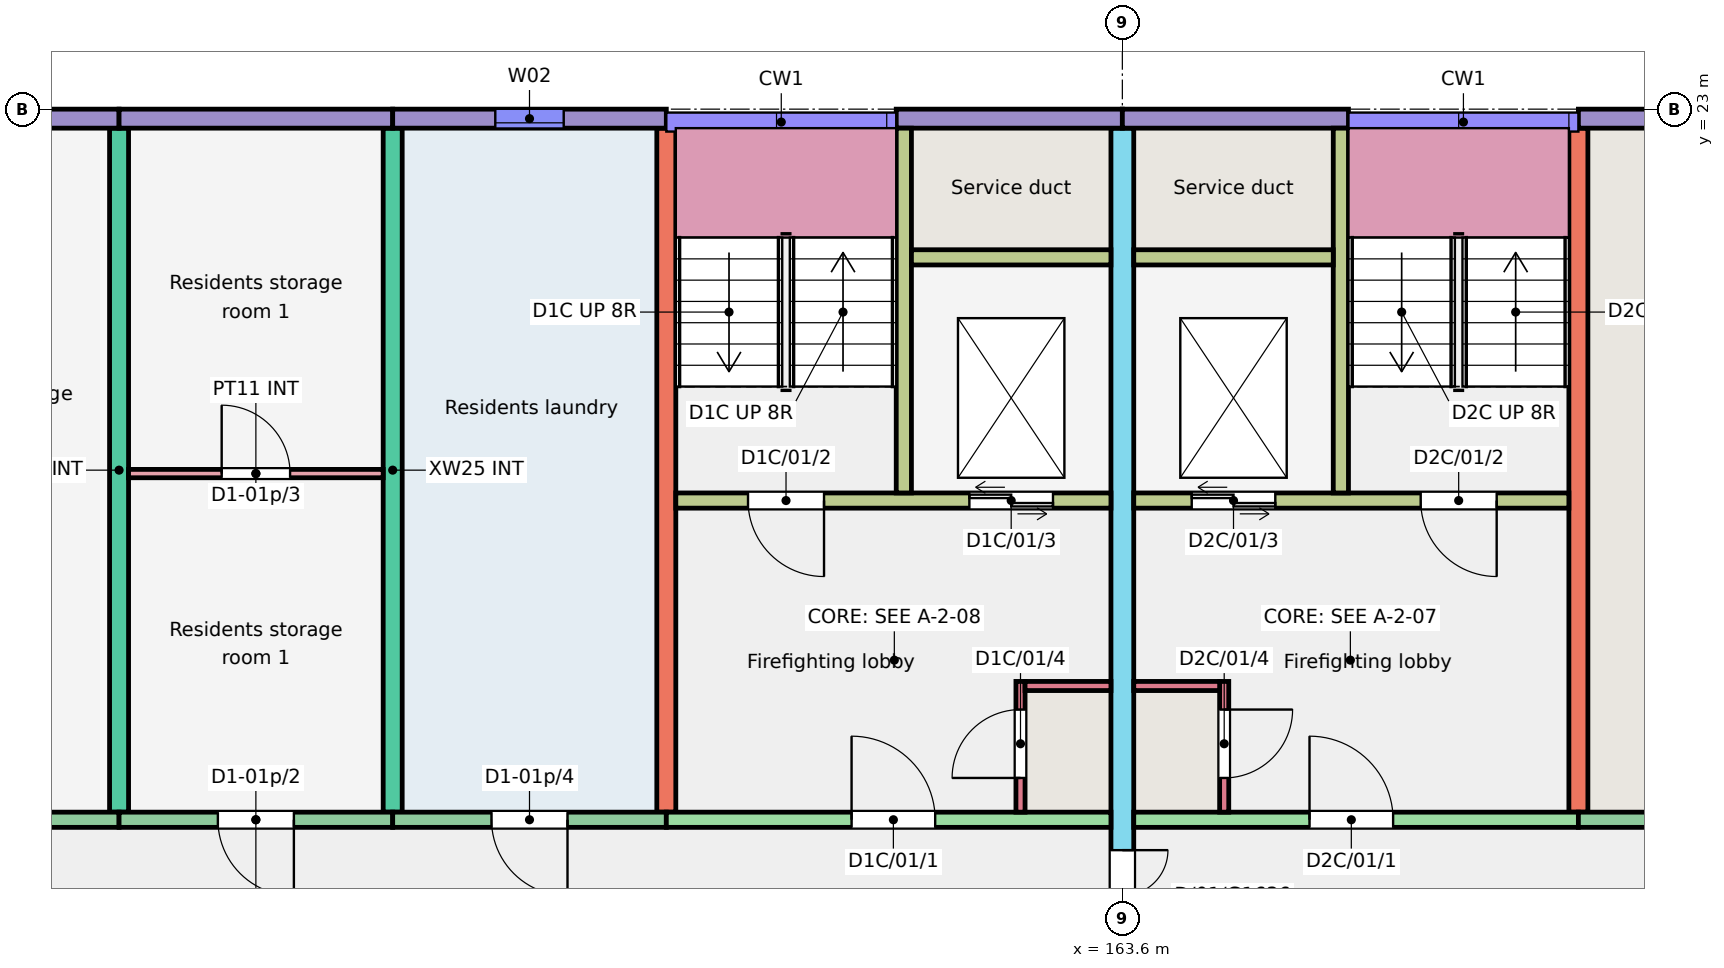
"""IFC4 building model, lengths in metres.
Left out: names, types, materials, properties, quantities, classifications, styles, units other than length and angle.
Written with IfcOpenShell. Run it as: python <this file> out.ifc"""

import sys

from ifc_helpers import new_model, si_unit, direction, frame, frame_2d, origin, place, context, subcontext, project, spatial, rectangle, extrude, element, fill, save


model = new_model("IFC4")
c1 = context("Model", 3, precision=1e-05, world=origin(), true_north=direction((0.0, 1.0)))
c2 = subcontext(c1, "Body", "Model", "MODEL_VIEW")
j1 = project(units=[si_unit("LENGTHUNIT", "METRE"), si_unit("PLANEANGLEUNIT", "RADIAN")], contexts=[c1])
p1 = place(None, origin())
s1 = spatial("IfcSite", under=j1, at=p1, CompositionType="ELEMENT")
p2 = place(p1, origin())
s2 = spatial("IfcBuilding", under=s1, at=p2, CompositionType="ELEMENT")
p3 = place(p2, frame((0.0, 0.0, 3.0)))
s3 = spatial("IfcBuildingStorey", under=s2, at=p3, CompositionType="ELEMENT", Elevation=3.0)
for number, where, z_axis, x_axis in (
    (1, (150.4, 13.75, 0.0), (0.0, 0.0, 1.0), (0.0, 1.0, 0.0)),
    (2, (154.0, 13.75, 0.0), (0.0, 0.0, 1.0), (0.0, 1.0, 0.0)),
    (3, (157.6, 13.75, 0.0), (0.0, 0.0, 1.0), (0.0, 1.0, 0.0)),
):
    element("IfcWall", number, at=place(p3, frame(where, z_axis=z_axis, x_axis=x_axis)), inside=s3, PredefinedType="SHEAR", context=c2, shape_type="SweptSolid", body=[
        extrude(rectangle(XDim=9.0, YDim=0.25, at=frame_2d((4.5, 0.0))), origin(), (0.0, 0.0, 1.0), 3.0),
    ])
p4 = place(p3, frame((163.6, 11.75, 0.0), z_axis=(0.0, 0.0, 1.0), x_axis=(0.0, 1.0, 0.0)))
e4 = element("IfcWall", 4, at=p4, inside=s3, PredefinedType="SHEAR", context=c2, shape_type="SweptSolid", body=[
    extrude(rectangle(XDim=11.0, YDim=0.3, at=frame_2d((5.5, 0.0))), origin(), (0.0, 0.0, 1.0), 3.0),
])
p5 = place(p4, frame((0.3, 0.0, 0.0)))
e5 = element("IfcOpeningElement", 5, at=p5, cuts=e4, PredefinedType="OPENING", context=c2, shape_type="SweptSolid", body=[
    extrude(rectangle(XDim=1.2, YDim=2.1, at=frame_2d((0.6, 1.05))), frame((0.0, 0.16, 0.0), z_axis=(0.0, -1.0, 0.0), x_axis=(1.0, 0.0, 0.0)), (0.0, 0.0, 1.0), 0.32),
])
p6 = place(p3, frame((169.6, 13.75, 0.0), z_axis=(0.0, 0.0, 1.0), x_axis=(0.0, 1.0, 0.0)))
e6 = element("IfcWall", 6, at=p6, inside=s3, PredefinedType="SHEAR", context=c2, shape_type="SweptSolid", body=[
    extrude(rectangle(XDim=9.0, YDim=0.25, at=frame_2d((4.5, 0.0))), origin(), (0.0, 0.0, 1.0), 3.0),
])
p7 = place(p3, frame((146.65, 22.875, 0.0), z_axis=(0.0, 0.0, 1.0), x_axis=(1.0, 0.0, 0.0)))
e7 = element("IfcWall", 7, at=p7, inside=s3, PredefinedType="SOLIDWALL", context=c2, shape_type="SweptSolid", body=[
    extrude(rectangle(XDim=3.75, YDim=0.25, at=frame_2d((1.875, 0.0))), origin(), (0.0, 0.0, 1.0), 3.0),
])
p8 = place(p3, frame((146.95, 13.65, 0.0), z_axis=(0.0, 0.0, 1.0), x_axis=(1.0, 0.0, 0.0)))
e8 = element("IfcWall", 8, at=p8, inside=s3, PredefinedType="SOLIDWALL", context=c2, shape_type="SweptSolid", body=[
    extrude(rectangle(XDim=3.45, YDim=0.2, at=frame_2d((1.725, 0.0))), origin(), (0.0, 0.0, 1.0), 3.0),
])
p9 = place(p8, frame((1.163, 0.0, 0.0)))
e9 = element("IfcOpeningElement", 9, at=p9, cuts=e8, PredefinedType="OPENING", context=c2, shape_type="SweptSolid", body=[
    extrude(rectangle(XDim=1.0, YDim=2.1, at=frame_2d((0.5, 1.05))), frame((0.0, 0.11, 0.0), z_axis=(0.0, -1.0, 0.0), x_axis=(1.0, 0.0, 0.0)), (0.0, 0.0, 1.0), 0.22),
])
p10 = place(p3, frame((150.4, 22.875, 0.0), z_axis=(0.0, 0.0, 1.0), x_axis=(1.0, 0.0, 0.0)))
e10 = element("IfcWall", 10, at=p10, inside=s3, PredefinedType="SOLIDWALL", context=c2, shape_type="SweptSolid", body=[
    extrude(rectangle(XDim=3.6, YDim=0.25, at=frame_2d((1.8, 0.0))), origin(), (0.0, 0.0, 1.0), 3.0),
])
p11 = place(p3, frame((150.4, 13.65, 0.0), z_axis=(0.0, 0.0, 1.0), x_axis=(1.0, 0.0, 0.0)))
e11 = element("IfcWall", 11, at=p11, inside=s3, PredefinedType="SOLIDWALL", context=c2, shape_type="SweptSolid", body=[
    extrude(rectangle(XDim=3.6, YDim=0.2, at=frame_2d((1.8, 0.0))), origin(), (0.0, 0.0, 1.0), 3.0),
])
p12 = place(p11, frame((1.3, 0.0, 0.0)))
e12 = element("IfcOpeningElement", 12, at=p12, cuts=e11, PredefinedType="OPENING", context=c2, shape_type="SweptSolid", body=[
    extrude(rectangle(XDim=1.0, YDim=2.1, at=frame_2d((0.5, 1.05))), frame((0.0, 0.11, 0.0), z_axis=(0.0, -1.0, 0.0), x_axis=(1.0, 0.0, 0.0)), (0.0, 0.0, 1.0), 0.22),
])
p13 = place(p3, frame((154.0, 22.875, 0.0), z_axis=(0.0, 0.0, 1.0), x_axis=(1.0, 0.0, 0.0)))
e13 = element("IfcWall", 13, at=p13, inside=s3, PredefinedType="SOLIDWALL", context=c2, shape_type="SweptSolid", body=[
    extrude(rectangle(XDim=3.6, YDim=0.25, at=frame_2d((1.8, 0.0))), origin(), (0.0, 0.0, 1.0), 3.0),
])
p14 = place(p13, frame((1.35, 0.0, 1.8)))
e14 = element("IfcOpeningElement", 14, at=p14, cuts=e13, PredefinedType="OPENING", context=c2, shape_type="SweptSolid", body=[
    extrude(rectangle(XDim=0.9, YDim=0.6, at=frame_2d((0.45, 0.3))), frame((0.0, 0.135, 0.0), z_axis=(0.0, -1.0, 0.0), x_axis=(1.0, 0.0, 0.0)), (0.0, 0.0, 1.0), 0.27),
])
p15 = place(p3, frame((154.0, 13.65, 0.0), z_axis=(0.0, 0.0, 1.0), x_axis=(1.0, 0.0, 0.0)))
e15 = element("IfcWall", 15, at=p15, inside=s3, PredefinedType="SOLIDWALL", context=c2, shape_type="SweptSolid", body=[
    extrude(rectangle(XDim=3.6, YDim=0.2, at=frame_2d((1.8, 0.0))), origin(), (0.0, 0.0, 1.0), 3.0),
])
p16 = place(p15, frame((1.3, 0.0, 0.0)))
e16 = element("IfcOpeningElement", 16, at=p16, cuts=e15, PredefinedType="OPENING", context=c2, shape_type="SweptSolid", body=[
    extrude(rectangle(XDim=1.0, YDim=2.1, at=frame_2d((0.5, 1.05))), frame((0.0, 0.11, 0.0), z_axis=(0.0, -1.0, 0.0), x_axis=(1.0, 0.0, 0.0)), (0.0, 0.0, 1.0), 0.22),
])
p17 = place(p3, frame((160.625, 22.875, 0.0), z_axis=(0.0, 0.0, 1.0), x_axis=(1.0, 0.0, 0.0)))
e17 = element("IfcWall", 17, at=p17, inside=s3, PredefinedType="SOLIDWALL", context=c2, shape_type="SweptSolid", body=[
    extrude(rectangle(XDim=2.975, YDim=0.25, at=frame_2d((1.488, 0.0))), origin(), (0.0, 0.0, 1.0), 3.0),
])
p18 = place(p3, frame((157.6, 13.65, 0.0), z_axis=(0.0, 0.0, 1.0), x_axis=(1.0, 0.0, 0.0)))
e18 = element("IfcWall", 18, at=p18, inside=s3, PredefinedType="SHEAR", context=c2, shape_type="SweptSolid", body=[
    extrude(rectangle(XDim=5.85, YDim=0.2, at=frame_2d((2.925, 0.0))), origin(), (0.0, 0.0, 1.0), 3.0),
])
p19 = place(p18, frame((2.438, 0.0, 0.0)))
e19 = element("IfcOpeningElement", 19, at=p19, cuts=e18, PredefinedType="OPENING", context=c2, shape_type="SweptSolid", body=[
    extrude(rectangle(XDim=1.1, YDim=2.1, at=frame_2d((0.55, 1.05))), frame((0.0, 0.11, 0.0), z_axis=(0.0, -1.0, 0.0), x_axis=(1.0, 0.0, 0.0)), (0.0, 0.0, 1.0), 0.22),
])
p20 = place(p3, frame((157.725, 17.85, 0.0), z_axis=(0.0, 0.0, 1.0), x_axis=(1.0, 0.0, 0.0)))
e20 = element("IfcWall", 20, at=p20, inside=s3, PredefinedType="SHEAR", context=c2, shape_type="SweptSolid", body=[
    extrude(rectangle(XDim=5.725, YDim=0.2, at=frame_2d((2.862, 0.0))), origin(), (0.0, 0.0, 1.0), 3.0),
])
p21 = place(p20, frame((0.95, 0.0, 0.0)))
e21 = element("IfcOpeningElement", 21, at=p21, cuts=e20, PredefinedType="OPENING", context=c2, shape_type="SweptSolid", body=[
    extrude(rectangle(XDim=1.0, YDim=2.1, at=frame_2d((0.5, 1.05))), frame((0.0, 0.11, 0.0), z_axis=(0.0, -1.0, 0.0), x_axis=(1.0, 0.0, 0.0)), (0.0, 0.0, 1.0), 0.22),
])
p22 = place(p20, frame((3.863, 0.0, 0.0)))
e22 = element("IfcOpeningElement", 22, at=p22, cuts=e20, PredefinedType="OPENING", context=c2, shape_type="SweptSolid", body=[
    extrude(rectangle(XDim=1.1, YDim=2.1, at=frame_2d((0.55, 1.05))), frame((0.0, 0.11, 0.0), z_axis=(0.0, -1.0, 0.0), x_axis=(1.0, 0.0, 0.0)), (0.0, 0.0, 1.0), 0.22),
])
p23 = place(p3, frame((160.725, 17.95, 0.0), z_axis=(0.0, 0.0, 1.0), x_axis=(0.0, 1.0, 0.0)))
e23 = element("IfcWall", 23, at=p23, inside=s3, PredefinedType="SHEAR", context=c2, shape_type="SweptSolid", body=[
    extrude(rectangle(XDim=4.8, YDim=0.2, at=frame_2d((2.4, 0.0))), origin(), (0.0, 0.0, 1.0), 3.0),
])
p24 = place(p3, frame((160.825, 21.05, 0.0), z_axis=(0.0, 0.0, 1.0), x_axis=(1.0, 0.0, 0.0)))
e24 = element("IfcWall", 24, at=p24, inside=s3, PredefinedType="SHEAR", context=c2, shape_type="SweptSolid", body=[
    extrude(rectangle(XDim=2.625, YDim=0.2, at=frame_2d((1.312, 0.0))), origin(), (0.0, 0.0, 1.0), 3.0),
])
p25 = place(p3, frame((162.26, 13.75, 0.0), z_axis=(0.0, 0.0, 1.0), x_axis=(0.0, 1.0, 0.0)))
e25 = element("IfcWall", 25, at=p25, inside=s3, PredefinedType="SHEAR", context=c2, shape_type="SweptSolid", body=[
    extrude(rectangle(XDim=1.72, YDim=0.12, at=frame_2d((0.86, 0.0))), origin(), (0.0, 0.0, 1.0), 3.0),
])
p26 = place(p25, frame((0.45, 0.0, 0.0)))
e26 = element("IfcOpeningElement", 26, at=p26, cuts=e25, PredefinedType="OPENING", context=c2, shape_type="SweptSolid", body=[
    extrude(rectangle(XDim=0.9, YDim=2.1, at=frame_2d((0.45, 1.05))), frame((0.0, 0.07, 0.0), z_axis=(0.0, -1.0, 0.0), x_axis=(1.0, 0.0, 0.0)), (0.0, 0.0, 1.0), 0.14),
])
p27 = place(p3, frame((162.32, 15.41, 0.0), z_axis=(0.0, 0.0, 1.0), x_axis=(1.0, 0.0, 0.0)))
e27 = element("IfcWall", 27, at=p27, inside=s3, PredefinedType="SHEAR", context=c2, shape_type="SweptSolid", body=[
    extrude(rectangle(XDim=1.13, YDim=0.12, at=frame_2d((0.565, 0.0))), origin(), (0.0, 0.0, 1.0), 3.0),
])
p28 = place(p3, frame((163.6, 22.875, 0.0), z_axis=(0.0, 0.0, 1.0), x_axis=(1.0, 0.0, 0.0)))
e28 = element("IfcWall", 28, at=p28, inside=s3, PredefinedType="SOLIDWALL", context=c2, shape_type="SweptSolid", body=[
    extrude(rectangle(XDim=2.975, YDim=0.25, at=frame_2d((1.487, 0.0))), origin(), (0.0, 0.0, 1.0), 3.0),
])
p29 = place(p3, frame((163.75, 13.65, 0.0), z_axis=(0.0, 0.0, 1.0), x_axis=(1.0, 0.0, 0.0)))
e29 = element("IfcWall", 29, at=p29, inside=s3, PredefinedType="SHEAR", context=c2, shape_type="SweptSolid", body=[
    extrude(rectangle(XDim=5.85, YDim=0.2, at=frame_2d((2.925, 0.0))), origin(), (0.0, 0.0, 1.0), 3.0),
])
p30 = place(p29, frame((2.312, 0.0, 0.0)))
e30 = element("IfcOpeningElement", 30, at=p30, cuts=e29, PredefinedType="OPENING", context=c2, shape_type="SweptSolid", body=[
    extrude(rectangle(XDim=1.1, YDim=2.1, at=frame_2d((0.55, 1.05))), frame((0.0, 0.11, 0.0), z_axis=(0.0, -1.0, 0.0), x_axis=(1.0, 0.0, 0.0)), (0.0, 0.0, 1.0), 0.22),
])
p31 = place(p3, frame((163.75, 17.85, 0.0), z_axis=(0.0, 0.0, 1.0), x_axis=(1.0, 0.0, 0.0)))
e31 = element("IfcWall", 31, at=p31, inside=s3, PredefinedType="SHEAR", context=c2, shape_type="SweptSolid", body=[
    extrude(rectangle(XDim=5.725, YDim=0.2, at=frame_2d((2.863, 0.0))), origin(), (0.0, 0.0, 1.0), 3.0),
])
p32 = place(p31, frame((3.775, 0.0, 0.0)))
e32 = element("IfcOpeningElement", 32, at=p32, cuts=e31, PredefinedType="OPENING", context=c2, shape_type="SweptSolid", body=[
    extrude(rectangle(XDim=1.0, YDim=2.1, at=frame_2d((0.5, 1.05))), frame((0.0, 0.11, 0.0), z_axis=(0.0, -1.0, 0.0), x_axis=(1.0, 0.0, 0.0)), (0.0, 0.0, 1.0), 0.22),
])
p33 = place(p31, frame((0.762, 0.0, 0.0)))
e33 = element("IfcOpeningElement", 33, at=p33, cuts=e31, PredefinedType="OPENING", context=c2, shape_type="SweptSolid", body=[
    extrude(rectangle(XDim=1.1, YDim=2.1, at=frame_2d((0.55, 1.05))), frame((0.0, 0.11, 0.0), z_axis=(0.0, -1.0, 0.0), x_axis=(1.0, 0.0, 0.0)), (0.0, 0.0, 1.0), 0.22),
])
p34 = place(p3, frame((166.475, 17.95, 0.0), z_axis=(0.0, 0.0, 1.0), x_axis=(0.0, 1.0, 0.0)))
e34 = element("IfcWall", 34, at=p34, inside=s3, PredefinedType="SHEAR", context=c2, shape_type="SweptSolid", body=[
    extrude(rectangle(XDim=4.8, YDim=0.2, at=frame_2d((2.4, 0.0))), origin(), (0.0, 0.0, 1.0), 3.0),
])
p35 = place(p3, frame((163.75, 21.05, 0.0), z_axis=(0.0, 0.0, 1.0), x_axis=(1.0, 0.0, 0.0)))
e35 = element("IfcWall", 35, at=p35, inside=s3, PredefinedType="SHEAR", context=c2, shape_type="SweptSolid", body=[
    extrude(rectangle(XDim=2.625, YDim=0.2, at=frame_2d((1.312, 0.0))), origin(), (0.0, 0.0, 1.0), 3.0),
])
p36 = place(p3, frame((164.94, 13.75, 0.0), z_axis=(0.0, 0.0, 1.0), x_axis=(0.0, 1.0, 0.0)))
e36 = element("IfcWall", 36, at=p36, inside=s3, PredefinedType="SHEAR", context=c2, shape_type="SweptSolid", body=[
    extrude(rectangle(XDim=1.72, YDim=0.12, at=frame_2d((0.86, 0.0))), origin(), (0.0, 0.0, 1.0), 3.0),
])
p37 = place(p36, frame((0.45, 0.0, 0.0)))
e37 = element("IfcOpeningElement", 37, at=p37, cuts=e36, PredefinedType="OPENING", context=c2, shape_type="SweptSolid", body=[
    extrude(rectangle(XDim=0.9, YDim=2.1, at=frame_2d((0.45, 1.05))), frame((0.0, 0.07, 0.0), z_axis=(0.0, -1.0, 0.0), x_axis=(1.0, 0.0, 0.0)), (0.0, 0.0, 1.0), 0.14),
])
p38 = place(p3, frame((163.75, 15.41, 0.0), z_axis=(0.0, 0.0, 1.0), x_axis=(1.0, 0.0, 0.0)))
e38 = element("IfcWall", 38, at=p38, inside=s3, PredefinedType="SHEAR", context=c2, shape_type="SweptSolid", body=[
    extrude(rectangle(XDim=1.13, YDim=0.12, at=frame_2d((0.565, 0.0))), origin(), (0.0, 0.0, 1.0), 3.0),
])
p39 = place(p3, frame((169.6, 22.875, 0.0), z_axis=(0.0, 0.0, 1.0), x_axis=(1.0, 0.0, 0.0)))
e39 = element("IfcWall", 39, at=p39, inside=s3, PredefinedType="SOLIDWALL", context=c2, shape_type="SweptSolid", body=[
    extrude(rectangle(XDim=3.6, YDim=0.25, at=frame_2d((1.8, 0.0))), origin(), (0.0, 0.0, 1.0), 3.0),
])
p40 = place(p3, frame((169.6, 13.65, 0.0), z_axis=(0.0, 0.0, 1.0), x_axis=(1.0, 0.0, 0.0)))
e40 = element("IfcWall", 40, at=p40, inside=s3, PredefinedType="SOLIDWALL", context=c2, shape_type="SweptSolid", body=[
    extrude(rectangle(XDim=3.6, YDim=0.2, at=frame_2d((1.8, 0.0))), origin(), (0.0, 0.0, 1.0), 3.0),
])
p41 = place(p40, frame((1.3, 0.0, 0.0)))
e41 = element("IfcOpeningElement", 41, at=p41, cuts=e40, PredefinedType="OPENING", context=c2, shape_type="SweptSolid", body=[
    extrude(rectangle(XDim=1.0, YDim=2.1, at=frame_2d((0.5, 1.05))), frame((0.0, 0.11, 0.0), z_axis=(0.0, -1.0, 0.0), x_axis=(1.0, 0.0, 0.0)), (0.0, 0.0, 1.0), 0.22),
])
p42 = place(p3, frame((150.525, 18.205, 0.0), z_axis=(0.0, 0.0, 1.0), x_axis=(1.0, 0.0, 0.0)))
e42 = element("IfcWall", 42, at=p42, inside=s3, PredefinedType="PARTITIONING", context=c2, shape_type="SweptSolid", body=[
    extrude(rectangle(XDim=3.35, YDim=0.11, at=frame_2d((1.675, 0.0))), origin(), (0.0, 0.0, 1.0), 2.8),
])
p43 = place(p42, frame((1.225, 0.0, 0.0)))
e43 = element("IfcOpeningElement", 43, at=p43, cuts=e42, PredefinedType="OPENING", context=c2, shape_type="SweptSolid", body=[
    extrude(rectangle(XDim=0.9, YDim=2.1, at=frame_2d((0.45, 1.05))), frame((0.0, 0.065, 0.0), z_axis=(0.0, -1.0, 0.0), x_axis=(1.0, 0.0, 0.0)), (0.0, 0.0, 1.0), 0.13),
])
p44 = place(p14, origin())
e44 = element("IfcWindow", 44, at=p44, inside=s3, PartitioningType="SINGLE_PANEL", PredefinedType="WINDOW", context=c2, shape_type="SweptSolid", body=[
    extrude(rectangle(XDim=0.9, YDim=0.6, at=frame_2d((0.45, 0.3))), frame((0.0, -0.025, 0.0), z_axis=(0.0, -1.0, 0.0), x_axis=(1.0, 0.0, 0.0)), (0.0, 0.0, 1.0), 0.06),
])
fill(e14, e44)
p45 = place(p12, origin())
e45 = element("IfcDoor", 45, at=p45, inside=s3, OperationType="SINGLE_SWING_RIGHT", PredefinedType="DOOR", context=c2, shape_type="SweptSolid", body=[
    extrude(rectangle(XDim=1.0, YDim=2.1, at=frame_2d((0.5, 1.05))), frame((0.0, 0.025, 0.0), z_axis=(0.0, -1.0, 0.0), x_axis=(1.0, 0.0, 0.0)), (0.0, 0.0, 1.0), 0.05),
])
fill(e12, e45)
p46 = place(p43, origin())
e46 = element("IfcDoor", 46, at=p46, inside=s3, OperationType="SINGLE_SWING_LEFT", PredefinedType="DOOR", context=c2, shape_type="SweptSolid", body=[
    extrude(rectangle(XDim=0.9, YDim=2.1, at=frame_2d((0.45, 1.05))), frame((0.0, 0.025, 0.0), z_axis=(0.0, -1.0, 0.0), x_axis=(1.0, 0.0, 0.0)), (0.0, 0.0, 1.0), 0.05),
])
fill(e43, e46)
p47 = place(p16, origin())
e47 = element("IfcDoor", 47, at=p47, inside=s3, OperationType="SINGLE_SWING_RIGHT", PredefinedType="DOOR", context=c2, shape_type="SweptSolid", body=[
    extrude(rectangle(XDim=1.0, YDim=2.1, at=frame_2d((0.5, 1.05))), frame((0.0, 0.025, 0.0), z_axis=(0.0, -1.0, 0.0), x_axis=(1.0, 0.0, 0.0)), (0.0, 0.0, 1.0), 0.05),
])
fill(e16, e47)
p48 = place(p19, origin())
e48 = element("IfcDoor", 48, at=p48, inside=s3, OperationType="SINGLE_SWING_LEFT", PredefinedType="DOOR", context=c2, shape_type="SweptSolid", body=[
    extrude(rectangle(XDim=1.1, YDim=2.1, at=frame_2d((0.55, 1.05))), frame((0.0, 0.025, 0.0), z_axis=(0.0, -1.0, 0.0), x_axis=(1.0, 0.0, 0.0)), (0.0, 0.0, 1.0), 0.05),
])
fill(e19, e48)
p49 = place(p21, origin())
e49 = element("IfcDoor", 49, at=p49, inside=s3, OperationType="SINGLE_SWING_RIGHT", PredefinedType="DOOR", context=c2, shape_type="SweptSolid", body=[
    extrude(rectangle(XDim=1.0, YDim=2.1, at=frame_2d((0.5, 1.05))), frame((0.0, 0.025, 0.0), z_axis=(0.0, -1.0, 0.0), x_axis=(1.0, 0.0, 0.0)), (0.0, 0.0, 1.0), 0.05),
])
fill(e21, e49)
p50 = place(p22, origin())
e50 = element("IfcDoor", 50, at=p50, inside=s3, OperationType="DOUBLE_DOOR_SLIDING", PredefinedType="DOOR", context=c2, shape_type="SweptSolid", body=[
    extrude(rectangle(XDim=1.1, YDim=2.1, at=frame_2d((0.55, 1.05))), frame((0.0, 0.025, 0.0), z_axis=(0.0, -1.0, 0.0), x_axis=(1.0, 0.0, 0.0)), (0.0, 0.0, 1.0), 0.05),
])
fill(e22, e50)
p51 = place(p26, origin())
e51 = element("IfcDoor", 51, at=p51, inside=s3, OperationType="SINGLE_SWING_LEFT", PredefinedType="DOOR", context=c2, shape_type="SweptSolid", body=[
    extrude(rectangle(XDim=0.9, YDim=2.1, at=frame_2d((0.45, 1.05))), frame((0.0, 0.025, 0.0), z_axis=(0.0, -1.0, 0.0), x_axis=(1.0, 0.0, 0.0)), (0.0, 0.0, 1.0), 0.05),
])
fill(e26, e51)
p52 = place(p30, origin())
e52 = element("IfcDoor", 52, at=p52, inside=s3, OperationType="SINGLE_SWING_LEFT", PredefinedType="DOOR", context=c2, shape_type="SweptSolid", body=[
    extrude(rectangle(XDim=1.1, YDim=2.1, at=frame_2d((0.55, 1.05))), frame((0.0, 0.025, 0.0), z_axis=(0.0, -1.0, 0.0), x_axis=(1.0, 0.0, 0.0)), (0.0, 0.0, 1.0), 0.05),
])
fill(e30, e52)
p53 = place(p32, origin())
e53 = element("IfcDoor", 53, at=p53, inside=s3, OperationType="SINGLE_SWING_RIGHT", PredefinedType="DOOR", context=c2, shape_type="SweptSolid", body=[
    extrude(rectangle(XDim=1.0, YDim=2.1, at=frame_2d((0.5, 1.05))), frame((0.0, 0.025, 0.0), z_axis=(0.0, -1.0, 0.0), x_axis=(1.0, 0.0, 0.0)), (0.0, 0.0, 1.0), 0.05),
])
fill(e32, e53)
p54 = place(p33, origin())
e54 = element("IfcDoor", 54, at=p54, inside=s3, OperationType="DOUBLE_DOOR_SLIDING", PredefinedType="DOOR", context=c2, shape_type="SweptSolid", body=[
    extrude(rectangle(XDim=1.1, YDim=2.1, at=frame_2d((0.55, 1.05))), frame((0.0, 0.025, 0.0), z_axis=(0.0, -1.0, 0.0), x_axis=(1.0, 0.0, 0.0)), (0.0, 0.0, 1.0), 0.05),
])
fill(e33, e54)
p55 = place(p37, origin())
e55 = element("IfcDoor", 55, at=p55, inside=s3, OperationType="SINGLE_SWING_RIGHT", PredefinedType="DOOR", context=c2, shape_type="SweptSolid", body=[
    extrude(rectangle(XDim=0.9, YDim=2.1, at=frame_2d((0.45, 1.05))), frame((0.0, 0.025, 0.0), z_axis=(0.0, -1.0, 0.0), x_axis=(1.0, 0.0, 0.0)), (0.0, 0.0, 1.0), 0.05),
])
fill(e37, e55)
p56 = place(p5, origin())
e56 = element("IfcDoor", 56, at=p56, inside=s3, OperationType="DOUBLE_DOOR_SINGLE_SWING", PredefinedType="DOOR", context=c2, shape_type="SweptSolid", body=[
    extrude(rectangle(XDim=1.2, YDim=2.1, at=frame_2d((0.6, 1.05))), frame((0.0, 0.025, 0.0), z_axis=(0.0, -1.0, 0.0), x_axis=(1.0, 0.0, 0.0)), (0.0, 0.0, 1.0), 0.05),
])
fill(e5, e56)
save(model, sys.argv[1])
